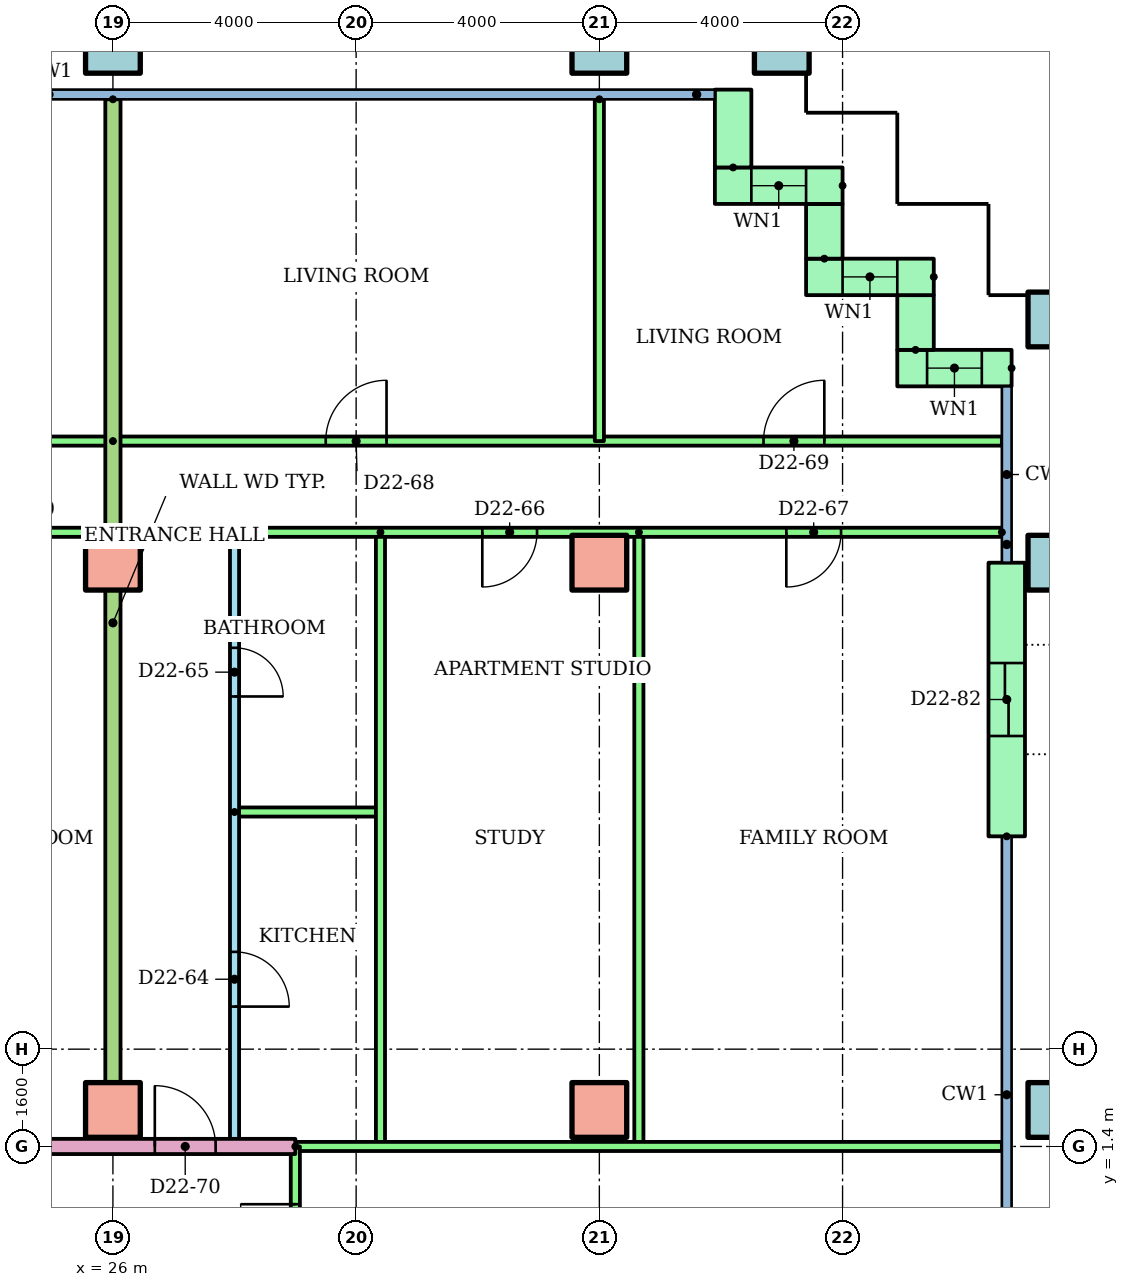
"""IFC4 building model, lengths in metres.
Left out: names, types, materials, properties, quantities, classifications, styles, units other than length and angle.
Written with IfcOpenShell. Run it as: python <this file> out.ifc"""

import sys

from ifc_helpers import new_model, si_unit, direction, frame, frame_2d, origin, origin_2d, place, context, subcontext, project, spatial, rectangle, hollow_rectangle, extrude, element, fill, save


model = new_model("IFC4")
c1 = context("Model", 3, precision=1e-05, world=origin(), true_north=direction((0.0, 1.0)))
c2 = subcontext(c1, "Body", "Model", "MODEL_VIEW")
j1 = project(units=[si_unit("LENGTHUNIT", "METRE"), si_unit("PLANEANGLEUNIT", "RADIAN")], contexts=[c1])
p1 = place(None, origin())
s1 = spatial("IfcSite", under=j1, at=p1, CompositionType="ELEMENT")
p2 = place(p1, origin())
s2 = spatial("IfcBuilding", under=s1, at=p2, CompositionType="ELEMENT")
p3 = place(p2, frame((0.0, 0.0, 87.1)))
s3 = spatial("IfcBuildingStorey", under=s2, at=p3, CompositionType="ELEMENT", Elevation=87.1)
for number, where in (
    (1, (26.0, 2.0, 0.0)),
    (2, (34.0, 2.0, 0.0)),
):
    element("IfcColumn", number, at=place(p3, frame(where)), inside=s3, PredefinedType="COLUMN", context=c2, shape_type="SweptSolid", body=[
        extrude(rectangle(XDim=0.9, YDim=0.9, at=origin_2d()), origin(), (0.0, 0.0, 1.0), 3.2),
    ])
p4 = place(p3, frame((41.5, 2.0, 0.0)))
e3 = element("IfcColumn", 3, at=p4, inside=s3, PredefinedType="COLUMN", context=c2, shape_type="SweptSolid", body=[
    extrude(hollow_rectangle(XDim=0.9, YDim=0.9, WallThickness=0.045, at=origin_2d()), origin(), (0.0, 0.0, 1.0), 3.2),
])
for number, where in (
    (4, (26.0, 11.0, 0.0)),
    (5, (34.0, 11.0, 0.0)),
):
    element("IfcColumn", number, at=place(p3, frame(where)), inside=s3, PredefinedType="COLUMN", context=c2, shape_type="SweptSolid", body=[
        extrude(rectangle(XDim=0.9, YDim=0.9, at=origin_2d()), origin(), (0.0, 0.0, 1.0), 3.2),
    ])
for number, where in (
    (6, (41.5, 11.0, 0.0)),
    (7, (41.5, 15.0, 0.0)),
    (8, (26.0, 19.5, 0.0)),
    (9, (34.0, 19.5, 0.0)),
    (10, (37.0, 19.5, 0.0)),
):
    element("IfcColumn", number, at=place(p3, frame(where)), inside=s3, PredefinedType="COLUMN", context=c2, shape_type="SweptSolid", body=[
        extrude(hollow_rectangle(XDim=0.9, YDim=0.9, WallThickness=0.045, at=origin_2d()), origin(), (0.0, 0.0, 1.0), 3.2),
    ])
p5 = place(p3, frame((40.78, 14.2, 0.0), z_axis=(0.0, 0.0, 1.0), x_axis=(-1.0, 0.0, 0.0)))
e11 = element("IfcWall", 11, at=p5, inside=s3, PredefinedType="STANDARD", context=c2, shape_type="SweptSolid", body=[
    extrude(rectangle(XDim=1.88, YDim=0.6, at=frame_2d((0.94, 0.0))), origin(), (0.0, 0.0, 1.0), 2.92),
])
p6 = place(p5, frame((0.49, 0.0, 0.9)))
e12 = element("IfcOpeningElement", 12, at=p6, cuts=e11, PredefinedType="OPENING", context=c2, shape_type="SweptSolid", body=[
    extrude(rectangle(XDim=0.9, YDim=1.5, at=frame_2d((0.45, 0.75))), frame((0.0, 0.31, 0.0), z_axis=(0.0, -1.0, 0.0), x_axis=(1.0, 0.0, 0.0)), (0.0, 0.0, 1.0), 0.62),
])
p7 = place(p3, frame((39.2, 14.5, 0.0), z_axis=(0.0, 0.0, 1.0), x_axis=(0.0, 1.0, 0.0)))
e13 = element("IfcWall", 13, at=p7, inside=s3, PredefinedType="STANDARD", context=c2, shape_type="SweptSolid", body=[
    extrude(rectangle(XDim=0.9, YDim=0.6, at=frame_2d((0.45, 0.0))), origin(), (0.0, 0.0, 1.0), 2.92),
])
p8 = place(p3, frame((39.5, 15.7, 0.0), z_axis=(0.0, 0.0, 1.0), x_axis=(-1.0, 0.0, 0.0)))
e14 = element("IfcWall", 14, at=p8, inside=s3, PredefinedType="STANDARD", context=c2, shape_type="SweptSolid", body=[
    extrude(rectangle(XDim=2.1, YDim=0.6, at=frame_2d((1.05, 0.0))), origin(), (0.0, 0.0, 1.0), 2.92),
])
p9 = place(p8, frame((0.6, 0.0, 0.9)))
e15 = element("IfcOpeningElement", 15, at=p9, cuts=e14, PredefinedType="OPENING", context=c2, shape_type="SweptSolid", body=[
    extrude(rectangle(XDim=0.9, YDim=1.5, at=frame_2d((0.45, 0.75))), frame((0.0, 0.31, 0.0), z_axis=(0.0, -1.0, 0.0), x_axis=(1.0, 0.0, 0.0)), (0.0, 0.0, 1.0), 0.62),
])
p10 = place(p3, frame((37.7, 16.0, 0.0), z_axis=(0.0, 0.0, 1.0), x_axis=(0.0, 1.0, 0.0)))
e16 = element("IfcWall", 16, at=p10, inside=s3, PredefinedType="STANDARD", context=c2, shape_type="SweptSolid", body=[
    extrude(rectangle(XDim=0.9, YDim=0.6, at=frame_2d((0.45, 0.0))), origin(), (0.0, 0.0, 1.0), 2.92),
])
p11 = place(p3, frame((38.0, 17.2, 0.0), z_axis=(0.0, 0.0, 1.0), x_axis=(-1.0, 0.0, 0.0)))
e17 = element("IfcWall", 17, at=p11, inside=s3, PredefinedType="STANDARD", context=c2, shape_type="SweptSolid", body=[
    extrude(rectangle(XDim=2.1, YDim=0.6, at=frame_2d((1.05, 0.0))), origin(), (0.0, 0.0, 1.0), 2.92),
])
p12 = place(p11, frame((0.6, 0.0, 0.9)))
e18 = element("IfcOpeningElement", 18, at=p12, cuts=e17, PredefinedType="OPENING", context=c2, shape_type="SweptSolid", body=[
    extrude(rectangle(XDim=0.9, YDim=1.5, at=frame_2d((0.45, 0.75))), frame((0.0, 0.31, 0.0), z_axis=(0.0, -1.0, 0.0), x_axis=(1.0, 0.0, 0.0)), (0.0, 0.0, 1.0), 0.62),
])
p13 = place(p3, frame((36.2, 17.5, 0.0), z_axis=(0.0, 0.0, 1.0), x_axis=(0.0, 1.0, 0.0)))
e19 = element("IfcWall", 19, at=p13, inside=s3, PredefinedType="STANDARD", context=c2, shape_type="SweptSolid", body=[
    extrude(rectangle(XDim=1.28, YDim=0.6, at=frame_2d((0.64, 0.0))), origin(), (0.0, 0.0, 1.0), 2.92),
])
p14 = place(p3, frame((40.7, 6.5, 0.0), z_axis=(0.0, 0.0, 1.0), x_axis=(0.0, 1.0, 0.0)))
e20 = element("IfcWall", 20, at=p14, inside=s3, PredefinedType="STANDARD", context=c2, shape_type="SweptSolid", body=[
    extrude(rectangle(XDim=4.5, YDim=0.6, at=frame_2d((2.25, 0.0))), origin(), (0.0, 0.0, 1.0), 2.92),
])
p15 = place(p14, frame((1.65, 0.0, 0.0)))
e21 = element("IfcOpeningElement", 21, at=p15, cuts=e20, PredefinedType="OPENING", context=c2, shape_type="SweptSolid", body=[
    extrude(rectangle(XDim=1.2, YDim=2.1, at=frame_2d((0.6, 1.05))), frame((0.0, 0.31, 0.0), z_axis=(0.0, -1.0, 0.0), x_axis=(1.0, 0.0, 0.0)), (0.0, 0.0, 1.0), 0.62),
])
p16 = place(p3, frame((26.0, 11.5, 0.0), z_axis=(0.0, 0.0, 1.0), x_axis=(-1.0, 0.0, 0.0)))
e22 = element("IfcWall", 22, at=p16, inside=s3, PredefinedType="PARTITIONING", context=c2, shape_type="SweptSolid", body=[
    extrude(rectangle(XDim=10.0, YDim=0.15, at=frame_2d((5.0, 0.0))), origin(), (0.0, 0.0, 1.0), 2.4),
])
p17 = place(p16, frame((4.9, 0.0, 0.0)))
e23 = element("IfcOpeningElement", 23, at=p17, cuts=e22, PredefinedType="OPENING", context=c2, shape_type="SweptSolid", body=[
    extrude(rectangle(XDim=0.9, YDim=2.1, at=frame_2d((0.45, 1.05))), frame((0.0, 0.085, 0.0), z_axis=(0.0, -1.0, 0.0), x_axis=(1.0, 0.0, 0.0)), (0.0, 0.0, 1.0), 0.17),
])
p18 = place(p16, frame((1.1, 0.0, 0.0)))
e24 = element("IfcOpeningElement", 24, at=p18, cuts=e22, PredefinedType="OPENING", context=c2, shape_type="SweptSolid", body=[
    extrude(rectangle(XDim=0.9, YDim=2.1, at=frame_2d((0.45, 1.05))), frame((0.0, 0.085, 0.0), z_axis=(0.0, -1.0, 0.0), x_axis=(1.0, 0.0, 0.0)), (0.0, 0.0, 1.0), 0.17),
])
p19 = place(p3, frame((14.0, 13.0, 0.0)))
e25 = element("IfcWall", 25, at=p19, inside=s3, PredefinedType="PARTITIONING", context=c2, shape_type="SweptSolid", body=[
    extrude(rectangle(XDim=12.0, YDim=0.15, at=frame_2d((6.0, 0.0))), origin(), (0.0, 0.0, 1.0), 2.4),
])
p20 = place(p19, frame((1.5, 0.0, 0.0)))
e26 = element("IfcOpeningElement", 26, at=p20, cuts=e25, PredefinedType="OPENING", context=c2, shape_type="SweptSolid", body=[
    extrude(rectangle(XDim=1.0, YDim=2.1, at=frame_2d((0.5, 1.05))), frame((0.0, 0.085, 0.0), z_axis=(0.0, -1.0, 0.0), x_axis=(1.0, 0.0, 0.0)), (0.0, 0.0, 1.0), 0.17),
])
p21 = place(p19, frame((7.55, 0.0, 0.0)))
e27 = element("IfcOpeningElement", 27, at=p21, cuts=e25, PredefinedType="OPENING", context=c2, shape_type="SweptSolid", body=[
    extrude(rectangle(XDim=0.9, YDim=2.1, at=frame_2d((0.45, 1.05))), frame((0.0, 0.085, 0.0), z_axis=(0.0, -1.0, 0.0), x_axis=(1.0, 0.0, 0.0)), (0.0, 0.0, 1.0), 0.17),
])
p22 = place(p3, frame((28.0, 11.5, 0.0), z_axis=(0.0, 0.0, 1.0), x_axis=(0.0, -1.0, 0.0)))
e28 = element("IfcWall", 28, at=p22, inside=s3, PredefinedType="PARTITIONING", context=c2, shape_type="SweptSolid", body=[
    extrude(rectangle(XDim=10.1, YDim=0.15, at=frame_2d((5.05, 0.0))), origin(), (0.0, 0.0, 1.0), 2.4),
])
p23 = place(p22, frame((6.9, 0.0, 0.0)))
e29 = element("IfcOpeningElement", 29, at=p23, cuts=e28, PredefinedType="OPENING", context=c2, shape_type="SweptSolid", body=[
    extrude(rectangle(XDim=0.9, YDim=2.1, at=frame_2d((0.45, 1.05))), frame((0.0, 0.085, 0.0), z_axis=(0.0, -1.0, 0.0), x_axis=(1.0, 0.0, 0.0)), (0.0, 0.0, 1.0), 0.17),
])
p24 = place(p22, frame((1.9, 0.0, 0.0)))
e30 = element("IfcOpeningElement", 30, at=p24, cuts=e28, PredefinedType="OPENING", context=c2, shape_type="SweptSolid", body=[
    extrude(rectangle(XDim=0.8, YDim=2.1, at=frame_2d((0.4, 1.05))), frame((0.0, 0.085, 0.0), z_axis=(0.0, -1.0, 0.0), x_axis=(1.0, 0.0, 0.0)), (0.0, 0.0, 1.0), 0.17),
])
p25 = place(p3, frame((28.0, 6.9, 0.0)))
e31 = element("IfcWall", 31, at=p25, inside=s3, PredefinedType="PARTITIONING", context=c2, shape_type="SweptSolid", body=[
    extrude(rectangle(XDim=2.4, YDim=0.15, at=frame_2d((1.2, 0.0))), origin(), (0.0, 0.0, 1.0), 2.4),
])
for number, where, z_axis, x_axis in (
    (32, (30.4, 11.5, 0.0), (0.0, 0.0, 1.0), (0.0, -1.0, 0.0)),
    (33, (34.65, 11.5, 0.0), (0.0, 0.0, 1.0), (0.0, -1.0, 0.0)),
):
    element("IfcWall", number, at=place(p3, frame(where, z_axis=z_axis, x_axis=x_axis)), inside=s3, PredefinedType="PARTITIONING", context=c2, shape_type="SweptSolid", body=[
        extrude(rectangle(XDim=10.1, YDim=0.15, at=frame_2d((5.05, 0.0))), origin(), (0.0, 0.0, 1.0), 2.4),
    ])
p26 = place(p3, frame((40.62, 11.5, 0.0), z_axis=(0.0, 0.0, 1.0), x_axis=(-1.0, 0.0, 0.0)))
e34 = element("IfcWall", 34, at=p26, inside=s3, PredefinedType="PARTITIONING", context=c2, shape_type="SweptSolid", body=[
    extrude(rectangle(XDim=12.62, YDim=0.15, at=frame_2d((6.31, 0.0))), origin(), (0.0, 0.0, 1.0), 2.4),
])
p27 = place(p26, frame((7.645, 0.0, 0.0)))
e35 = element("IfcOpeningElement", 35, at=p27, cuts=e34, PredefinedType="OPENING", context=c2, shape_type="SweptSolid", body=[
    extrude(rectangle(XDim=0.9, YDim=2.1, at=frame_2d((0.45, 1.05))), frame((0.0, 0.085, 0.0), z_axis=(0.0, -1.0, 0.0), x_axis=(1.0, 0.0, 0.0)), (0.0, 0.0, 1.0), 0.17),
])
p28 = place(p26, frame((2.645, 0.0, 0.0)))
e36 = element("IfcOpeningElement", 36, at=p28, cuts=e34, PredefinedType="OPENING", context=c2, shape_type="SweptSolid", body=[
    extrude(rectangle(XDim=0.9, YDim=2.1, at=frame_2d((0.45, 1.05))), frame((0.0, 0.085, 0.0), z_axis=(0.0, -1.0, 0.0), x_axis=(1.0, 0.0, 0.0)), (0.0, 0.0, 1.0), 0.17),
])
p29 = place(p3, frame((26.0, 13.0, 0.0)))
e37 = element("IfcWall", 37, at=p29, inside=s3, PredefinedType="PARTITIONING", context=c2, shape_type="SweptSolid", body=[
    extrude(rectangle(XDim=14.62, YDim=0.15, at=frame_2d((7.31, 0.0))), origin(), (0.0, 0.0, 1.0), 2.4),
])
p30 = place(p29, frame((3.5, 0.0, 0.0)))
e38 = element("IfcOpeningElement", 38, at=p30, cuts=e37, PredefinedType="OPENING", context=c2, shape_type="SweptSolid", body=[
    extrude(rectangle(XDim=1.0, YDim=2.1, at=frame_2d((0.5, 1.05))), frame((0.0, 0.085, 0.0), z_axis=(0.0, -1.0, 0.0), x_axis=(1.0, 0.0, 0.0)), (0.0, 0.0, 1.0), 0.17),
])
p31 = place(p29, frame((10.7, 0.0, 0.0)))
e39 = element("IfcOpeningElement", 39, at=p31, cuts=e37, PredefinedType="OPENING", context=c2, shape_type="SweptSolid", body=[
    extrude(rectangle(XDim=1.0, YDim=2.1, at=frame_2d((0.5, 1.05))), frame((0.0, 0.085, 0.0), z_axis=(0.0, -1.0, 0.0), x_axis=(1.0, 0.0, 0.0)), (0.0, 0.0, 1.0), 0.17),
])
p32 = place(p3, frame((34.0, 18.621, 0.0), z_axis=(0.0, 0.0, 1.0), x_axis=(0.0, -1.0, 0.0)))
e40 = element("IfcWall", 40, at=p32, inside=s3, PredefinedType="PARTITIONING", context=c2, shape_type="SweptSolid", body=[
    extrude(rectangle(XDim=5.621, YDim=0.15, at=frame_2d((2.811, 0.0))), origin(), (0.0, 0.0, 1.0), 2.4),
])
p33 = place(p3, frame((26.0, 18.621, 0.0), z_axis=(0.0, 0.0, 1.0), x_axis=(0.0, -1.0, 0.0)))
e41 = element("IfcWall", 41, at=p33, inside=s3, PredefinedType="PARTITIONING", context=c2, shape_type="SweptSolid", body=[
    extrude(rectangle(XDim=17.221, YDim=0.25, at=frame_2d((8.611, 0.0))), origin(), (0.0, 0.0, 1.0), 2.4),
])
p34 = place(p3, frame((14.0, 1.4, 0.0)))
e42 = element("IfcWall", 42, at=p34, inside=s3, PredefinedType="PARTITIONING", context=c2, shape_type="SweptSolid", body=[
    extrude(rectangle(XDim=15.0, YDim=0.25, at=frame_2d((7.5, 0.0))), origin(), (0.0, 0.0, 1.0), 2.4),
])
p35 = place(p34, frame((0.5, 0.0, 0.0)))
e43 = element("IfcOpeningElement", 43, at=p35, cuts=e42, PredefinedType="OPENING", context=c2, shape_type="SweptSolid", body=[
    extrude(rectangle(XDim=1.0, YDim=2.1, at=frame_2d((0.5, 1.05))), frame((0.0, 0.135, 0.0), z_axis=(0.0, -1.0, 0.0), x_axis=(1.0, 0.0, 0.0)), (0.0, 0.0, 1.0), 0.27),
])
p36 = place(p34, frame((12.689, 0.0, 0.0)))
e44 = element("IfcOpeningElement", 44, at=p36, cuts=e42, PredefinedType="OPENING", context=c2, shape_type="SweptSolid", body=[
    extrude(rectangle(XDim=1.0, YDim=2.1, at=frame_2d((0.5, 1.05))), frame((0.0, 0.135, 0.0), z_axis=(0.0, -1.0, 0.0), x_axis=(1.0, 0.0, 0.0)), (0.0, 0.0, 1.0), 0.27),
])
p37 = place(p3, frame((29.0, 1.4, 0.0)))
e45 = element("IfcWall", 45, at=p37, inside=s3, PredefinedType="PARTITIONING", context=c2, shape_type="SweptSolid", body=[
    extrude(rectangle(XDim=11.62, YDim=0.15, at=frame_2d((5.81, 0.0))), origin(), (0.0, 0.0, 1.0), 2.4),
])
p38 = place(p3, frame((29.0, -1.4, 0.0), z_axis=(0.0, 0.0, 1.0), x_axis=(0.0, 1.0, 0.0)))
e46 = element("IfcWall", 46, at=p38, inside=s3, PredefinedType="PARTITIONING", context=c2, shape_type="SweptSolid", body=[
    extrude(rectangle(XDim=2.8, YDim=0.15, at=frame_2d((1.4, 0.0))), origin(), (0.0, 0.0, 1.0), 2.4),
])
p39 = place(p38, frame((0.95, 0.0, 0.0)))
e47 = element("IfcOpeningElement", 47, at=p39, cuts=e46, PredefinedType="OPENING", context=c2, shape_type="SweptSolid", body=[
    extrude(rectangle(XDim=0.9, YDim=2.1, at=frame_2d((0.45, 1.05))), frame((0.0, 0.085, 0.0), z_axis=(0.0, -1.0, 0.0), x_axis=(1.0, 0.0, 0.0)), (0.0, 0.0, 1.0), 0.17),
])
p40 = place(p6, origin())
e48 = element("IfcWindow", 48, at=p40, inside=s3, PartitioningType="SINGLE_PANEL", PredefinedType="WINDOW", context=c2, shape_type="SweptSolid", body=[
    extrude(rectangle(XDim=0.9, YDim=1.5, at=frame_2d((0.45, 0.75))), frame((0.0, 0.03, 0.0), z_axis=(0.0, -1.0, 0.0), x_axis=(1.0, 0.0, 0.0)), (0.0, 0.0, 1.0), 0.06),
])
fill(e12, e48)
p41 = place(p9, origin())
e49 = element("IfcWindow", 49, at=p41, inside=s3, PartitioningType="SINGLE_PANEL", PredefinedType="WINDOW", context=c2, shape_type="SweptSolid", body=[
    extrude(rectangle(XDim=0.9, YDim=1.5, at=frame_2d((0.45, 0.75))), frame((0.0, 0.03, 0.0), z_axis=(0.0, -1.0, 0.0), x_axis=(1.0, 0.0, 0.0)), (0.0, 0.0, 1.0), 0.06),
])
fill(e15, e49)
p42 = place(p12, origin())
e50 = element("IfcWindow", 50, at=p42, inside=s3, PartitioningType="SINGLE_PANEL", PredefinedType="WINDOW", context=c2, shape_type="SweptSolid", body=[
    extrude(rectangle(XDim=0.9, YDim=1.5, at=frame_2d((0.45, 0.75))), frame((0.0, 0.03, 0.0), z_axis=(0.0, -1.0, 0.0), x_axis=(1.0, 0.0, 0.0)), (0.0, 0.0, 1.0), 0.06),
])
fill(e18, e50)
p43 = place(p23, origin())
e51 = element("IfcDoor", 51, at=p43, inside=s3, OperationType="SINGLE_SWING_RIGHT", PredefinedType="DOOR", context=c2, shape_type="SweptSolid", body=[
    extrude(rectangle(XDim=0.9, YDim=2.1, at=frame_2d((0.45, 1.05))), frame((0.0, 0.025, 0.0), z_axis=(0.0, -1.0, 0.0), x_axis=(1.0, 0.0, 0.0)), (0.0, 0.0, 1.0), 0.05),
])
fill(e29, e51)
p44 = place(p24, origin())
e52 = element("IfcDoor", 52, at=p44, inside=s3, OperationType="SINGLE_SWING_RIGHT", PredefinedType="DOOR", context=c2, shape_type="SweptSolid", body=[
    extrude(rectangle(XDim=0.8, YDim=2.1, at=frame_2d((0.4, 1.05))), frame((0.0, 0.025, 0.0), z_axis=(0.0, -1.0, 0.0), x_axis=(1.0, 0.0, 0.0)), (0.0, 0.0, 1.0), 0.05),
])
fill(e30, e52)
p45 = place(p27, origin())
e53 = element("IfcDoor", 53, at=p45, inside=s3, OperationType="SINGLE_SWING_RIGHT", PredefinedType="DOOR", context=c2, shape_type="SweptSolid", body=[
    extrude(rectangle(XDim=0.9, YDim=2.1, at=frame_2d((0.45, 1.05))), frame((0.0, 0.025, 0.0), z_axis=(0.0, -1.0, 0.0), x_axis=(1.0, 0.0, 0.0)), (0.0, 0.0, 1.0), 0.05),
])
fill(e35, e53)
p46 = place(p28, origin())
e54 = element("IfcDoor", 54, at=p46, inside=s3, OperationType="SINGLE_SWING_RIGHT", PredefinedType="DOOR", context=c2, shape_type="SweptSolid", body=[
    extrude(rectangle(XDim=0.9, YDim=2.1, at=frame_2d((0.45, 1.05))), frame((0.0, 0.025, 0.0), z_axis=(0.0, -1.0, 0.0), x_axis=(1.0, 0.0, 0.0)), (0.0, 0.0, 1.0), 0.05),
])
fill(e36, e54)
p47 = place(p30, origin())
e55 = element("IfcDoor", 55, at=p47, inside=s3, OperationType="SINGLE_SWING_RIGHT", PredefinedType="DOOR", context=c2, shape_type="SweptSolid", body=[
    extrude(rectangle(XDim=1.0, YDim=2.1, at=frame_2d((0.5, 1.05))), frame((0.0, 0.025, 0.0), z_axis=(0.0, -1.0, 0.0), x_axis=(1.0, 0.0, 0.0)), (0.0, 0.0, 1.0), 0.05),
])
fill(e38, e55)
p48 = place(p31, origin())
e56 = element("IfcDoor", 56, at=p48, inside=s3, OperationType="SINGLE_SWING_RIGHT", PredefinedType="DOOR", context=c2, shape_type="SweptSolid", body=[
    extrude(rectangle(XDim=1.0, YDim=2.1, at=frame_2d((0.5, 1.05))), frame((0.0, 0.025, 0.0), z_axis=(0.0, -1.0, 0.0), x_axis=(1.0, 0.0, 0.0)), (0.0, 0.0, 1.0), 0.05),
])
fill(e39, e56)
p49 = place(p36, origin())
e57 = element("IfcDoor", 57, at=p49, inside=s3, OperationType="SINGLE_SWING_LEFT", PredefinedType="DOOR", context=c2, shape_type="SweptSolid", body=[
    extrude(rectangle(XDim=1.0, YDim=2.1, at=frame_2d((0.5, 1.05))), frame((0.0, 0.025, 0.0), z_axis=(0.0, -1.0, 0.0), x_axis=(1.0, 0.0, 0.0)), (0.0, 0.0, 1.0), 0.05),
])
fill(e44, e57)
p50 = place(p39, origin())
e58 = element("IfcDoor", 58, at=p50, inside=s3, OperationType="SINGLE_SWING_RIGHT", PredefinedType="DOOR", context=c2, shape_type="SweptSolid", body=[
    extrude(rectangle(XDim=0.9, YDim=2.1, at=frame_2d((0.45, 1.05))), frame((0.0, 0.025, 0.0), z_axis=(0.0, -1.0, 0.0), x_axis=(1.0, 0.0, 0.0)), (0.0, 0.0, 1.0), 0.05),
])
fill(e47, e58)
p51 = place(p15, origin())
e59 = element("IfcDoor", 59, at=p51, inside=s3, OperationType="SLIDING_TO_LEFT", PredefinedType="DOOR", context=c2, shape_type="SweptSolid", body=[
    extrude(rectangle(XDim=1.2, YDim=2.1, at=frame_2d((0.6, 1.05))), frame((0.0, 0.025, 0.0), z_axis=(0.0, -1.0, 0.0), x_axis=(1.0, 0.0, 0.0)), (0.0, 0.0, 1.0), 0.05),
])
fill(e21, e59)
save(model, sys.argv[1])
